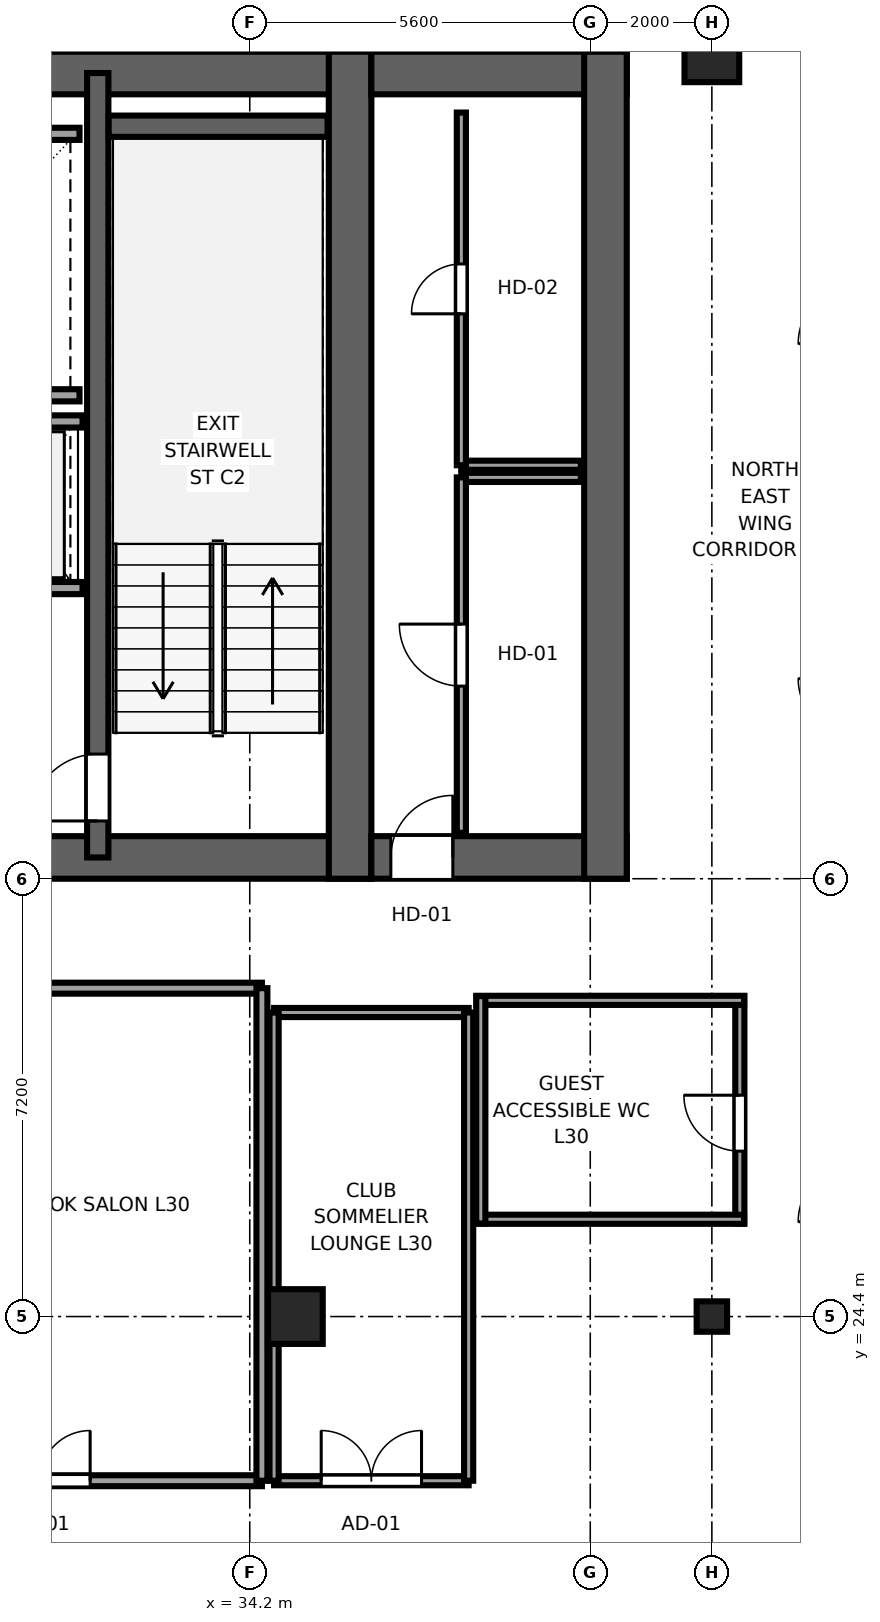
"""IFC4 building model, lengths in metres.
Left out: names, types, materials, properties, quantities, classifications, styles, units other than length and angle.
Written with IfcOpenShell. Run it as: python <this file> out.ifc"""

import sys

from ifc_helpers import new_model, si_unit, direction, frame, frame_2d, origin, origin_2d, place, context, subcontext, project, spatial, rectangle, i_section, extrude, source, transform, mapped, element, fill, save


model = new_model("IFC4")
c1 = context("Model", 3, precision=1e-05, world=origin(), true_north=direction((0.0, 1.0)))
c2 = subcontext(c1, "Body", "Model", "MODEL_VIEW")
j1 = project(units=[si_unit("LENGTHUNIT", "METRE"), si_unit("PLANEANGLEUNIT", "RADIAN")], contexts=[c1])
p1 = place(None, origin())
s1 = spatial("IfcSite", under=j1, at=p1, CompositionType="ELEMENT")
p2 = place(p1, origin())
s2 = spatial("IfcBuilding", under=s1, at=p2, CompositionType="ELEMENT")
p3 = place(p2, frame((0.0, 0.0, 118.65)))
s3 = spatial("IfcBuildingStorey", under=s2, at=p3, CompositionType="ELEMENT", Elevation=118.65)
p4 = place(p3, frame((9.8, 31.95, 0.0), z_axis=(0.0, 0.0, 1.0), x_axis=(1.0, 0.0, 0.0)))
e1 = element("IfcWall", 1, at=p4, inside=s3, PredefinedType="SHEAR", context=c2, shape_type="SweptSolid", body=[
    extrude(rectangle(XDim=26.4, YDim=0.7, at=frame_2d((13.2, 0.0))), origin(), (0.0, 0.0, 1.0), 3.55),
])
p5 = place(p4, frame((7.65, 0.0, 0.0), z_axis=(0.0, 0.0, 1.0), x_axis=(-1.0, 0.0, 0.0)))
e2 = element("IfcOpeningElement", 2, at=p5, cuts=e1, PredefinedType="OPENING", context=c2, shape_type="SweptSolid", body=[
    extrude(rectangle(XDim=1.5, YDim=2.04, at=frame_2d((0.75, 1.02))), frame((0.0, 0.36, 0.0), z_axis=(0.0, -1.0, 0.0), x_axis=(1.0, 0.0, 0.0)), (0.0, 0.0, 1.0), 0.72),
])
p6 = place(p4, frame((13.95, 0.0, 0.0), z_axis=(0.0, 0.0, 1.0), x_axis=(-1.0, 0.0, 0.0)))
e3 = element("IfcOpeningElement", 3, at=p6, cuts=e1, PredefinedType="OPENING", context=c2, shape_type="SweptSolid", body=[
    extrude(rectangle(XDim=1.5, YDim=2.04, at=frame_2d((0.75, 1.02))), frame((0.0, 0.36, 0.0), z_axis=(0.0, -1.0, 0.0), x_axis=(1.0, 0.0, 0.0)), (0.0, 0.0, 1.0), 0.72),
])
p7 = place(p4, frame((20.25, 0.0, 0.0), z_axis=(0.0, 0.0, 1.0), x_axis=(-1.0, 0.0, 0.0)))
e4 = element("IfcOpeningElement", 4, at=p7, cuts=e1, PredefinedType="OPENING", context=c2, shape_type="SweptSolid", body=[
    extrude(rectangle(XDim=1.5, YDim=2.04, at=frame_2d((0.75, 1.02))), frame((0.0, 0.36, 0.0), z_axis=(0.0, -1.0, 0.0), x_axis=(1.0, 0.0, 0.0)), (0.0, 0.0, 1.0), 0.72),
])
p8 = place(p3, frame((9.8, 44.85, 0.0), z_axis=(0.0, 0.0, 1.0), x_axis=(1.0, 0.0, 0.0)))
e5 = element("IfcWall", 5, at=p8, inside=s3, PredefinedType="SHEAR", context=c2, shape_type="SweptSolid", body=[
    extrude(rectangle(XDim=26.4, YDim=0.7, at=frame_2d((13.2, 0.0))), origin(), (0.0, 0.0, 1.0), 3.55),
])
p9 = place(p3, frame((35.85, 31.6, 0.0), z_axis=(0.0, 0.0, 1.0), x_axis=(0.0, 1.0, 0.0)))
e6 = element("IfcWall", 6, at=p9, inside=s3, PredefinedType="SHEAR", context=c2, shape_type="SweptSolid", body=[
    extrude(rectangle(XDim=13.6, YDim=0.7, at=frame_2d((6.8, 0.0))), origin(), (0.0, 0.0, 1.0), 3.55),
])
p10 = place(p3, frame((31.7, 31.95, 0.0), z_axis=(0.0, 0.0, 1.0), x_axis=(0.0, 1.0, 0.0)))
e7 = element("IfcWall", 7, at=p10, inside=s3, PredefinedType="SHEAR", context=c2, shape_type="SweptSolid", body=[
    extrude(rectangle(XDim=12.9, YDim=0.35, at=frame_2d((6.45, 0.0))), origin(), (0.0, 0.0, 1.0), 3.55),
])
p11 = place(p10, frame((1.7, 0.0, 0.0), z_axis=(0.0, 0.0, 1.0), x_axis=(-1.0, 0.0, 0.0)))
e8 = element("IfcOpeningElement", 8, at=p11, cuts=e7, PredefinedType="OPENING", context=c2, shape_type="SweptSolid", body=[
    extrude(rectangle(XDim=1.1, YDim=2.12, at=frame_2d((0.55, 1.06))), frame((0.0, 0.185, 0.0), z_axis=(0.0, -1.0, 0.0), x_axis=(1.0, 0.0, 0.0)), (0.0, 0.0, 1.0), 0.37),
])
p12 = place(p3, frame((36.2, 31.95, 0.0), z_axis=(0.0, 0.0, 1.0), x_axis=(1.0, 0.0, 0.0)))
e9 = element("IfcWall", 9, at=p12, inside=s3, PredefinedType="SHEAR", context=c2, shape_type="SweptSolid", body=[
    extrude(rectangle(XDim=4.2, YDim=0.7, at=frame_2d((2.1, 0.0))), origin(), (0.0, 0.0, 1.0), 3.55),
])
p13 = place(p12, frame((1.34, 0.0, 0.0), z_axis=(0.0, 0.0, 1.0), x_axis=(-1.0, 0.0, 0.0)))
e10 = element("IfcOpeningElement", 10, at=p13, cuts=e9, PredefinedType="OPENING", context=c2, shape_type="SweptSolid", body=[
    extrude(rectangle(XDim=1.02, YDim=2.03, at=frame_2d((0.51, 1.015))), frame((0.0, 0.36, 0.0), z_axis=(0.0, -1.0, 0.0), x_axis=(1.0, 0.0, 0.0)), (0.0, 0.0, 1.0), 0.72),
])
p14 = place(p3, frame((36.2, 44.85, 0.0), z_axis=(0.0, 0.0, 1.0), x_axis=(1.0, 0.0, 0.0)))
e11 = element("IfcWall", 11, at=p14, inside=s3, PredefinedType="SHEAR", context=c2, shape_type="SweptSolid", body=[
    extrude(rectangle(XDim=4.2, YDim=0.7, at=frame_2d((2.1, 0.0))), origin(), (0.0, 0.0, 1.0), 3.55),
])
p15 = place(p3, frame((40.05, 31.6, 0.0), z_axis=(0.0, 0.0, 1.0), x_axis=(0.0, 1.0, 0.0)))
e12 = element("IfcWall", 12, at=p15, inside=s3, PredefinedType="SHEAR", context=c2, shape_type="SweptSolid", body=[
    extrude(rectangle(XDim=13.6, YDim=0.7, at=frame_2d((6.8, 0.0))), origin(), (0.0, 0.0, 1.0), 3.55),
])
p16 = place(p3, frame((31.88, 43.975, 0.0), z_axis=(0.0, 0.0, 1.0), x_axis=(1.0, 0.0, 0.0)))
e13 = element("IfcWall", 13, at=p16, inside=s3, PredefinedType="SHEAR", context=c2, shape_type="SweptSolid", body=[
    extrude(rectangle(XDim=3.6, YDim=0.35, at=frame_2d((1.8, 0.0))), origin(), (0.0, 0.0, 1.0), 3.55),
])
m1 = source(origin(), c2, "Body", "SweptSolid", [
    extrude(rectangle(XDim=0.9, YDim=0.9, at=origin_2d()), origin(), (0.0, 0.0, 1.0), 3.55),
])
p17 = place(p3, frame((34.95, 24.4, 0.0), z_axis=(0.0, 0.0, 1.0), x_axis=(1.0, 0.0, 0.0)))
e14 = element("IfcColumn", 14, at=p17, inside=s3, PredefinedType="COLUMN", context=c2, shape_type="MappedRepresentation", body=[
    mapped(m1, transform((0.0, 0.0, 0.0), x_axis=(1.0, 0.0, 0.0), y_axis=(0.0, 1.0, 0.0), z_axis=(0.0, 0.0, 1.0), scale=1.0)),
])
m2 = source(origin(), c2, "Body", "SweptSolid", [
    extrude(i_section(OverallWidth=0.5, OverallDepth=0.5, WebThickness=0.022, FlangeThickness=0.034, at=origin_2d()), origin(), (0.0, 0.0, 1.0), 3.55),
])
p18 = place(p3, frame((41.8, 24.4, 0.0), z_axis=(0.0, 0.0, 1.0), x_axis=(1.0, 0.0, 0.0)))
e15 = element("IfcColumn", 15, at=p18, inside=s3, PredefinedType="COLUMN", context=c2, shape_type="MappedRepresentation", body=[
    mapped(m2, transform((0.0, 0.0, 0.0), x_axis=(1.0, 0.0, 0.0), y_axis=(0.0, 1.0, 0.0), z_axis=(0.0, 0.0, 1.0), scale=1.0)),
])
p19 = place(p3, frame((41.8, 45.15, 0.0), z_axis=(0.0, 0.0, 1.0), x_axis=(1.0, 0.0, 0.0)))
e16 = element("IfcColumn", 16, at=p19, inside=s3, PredefinedType="COLUMN", context=c2, shape_type="MappedRepresentation", body=[
    mapped(m1, transform((0.0, 0.0, 0.0), x_axis=(1.0, 0.0, 0.0), y_axis=(0.0, 1.0, 0.0), z_axis=(0.0, 0.0, 1.0), scale=1.0)),
])
for number, where, z_axis, x_axis in (
    (17, (27.3, 39.55, 0.0), (0.0, 0.0, 1.0), (1.0, 0.0, 0.0)),
    (18, (27.3, 43.85, 0.0), (0.0, 0.0, 1.0), (1.0, 0.0, 0.0)),
):
    element("IfcWall", number, at=place(p3, frame(where, z_axis=z_axis, x_axis=x_axis)), inside=s3, PredefinedType="SOLIDWALL", context=c2, shape_type="SweptSolid", body=[
        extrude(rectangle(XDim=4.1, YDim=0.2, at=frame_2d((2.05, 0.0))), origin(), (0.0, 0.0, 1.0), 3.37),
    ])
p20 = place(p3, frame((27.375, 36.38, 0.0), z_axis=(0.0, 0.0, 1.0), x_axis=(1.0, 0.0, 0.0)))
e19 = element("IfcWall", 19, at=p20, inside=s3, PredefinedType="SOLIDWALL", context=c2, shape_type="SweptSolid", body=[
    extrude(rectangle(XDim=4.075, YDim=0.2, at=frame_2d((2.038, 0.0))), origin(), (0.0, 0.0, 1.0), 3.37),
])
p21 = place(p20, frame((0.525, 0.0, 0.0)))
e20 = element("IfcOpeningElement", 20, at=p21, cuts=e19, PredefinedType="OPENING", context=c2, shape_type="SweptSolid", body=[
    extrude(rectangle(XDim=1.1, YDim=2.12, at=frame_2d((0.55, 1.06))), frame((0.0, 0.11, 0.0), z_axis=(0.0, -1.0, 0.0), x_axis=(1.0, 0.0, 0.0)), (0.0, 0.0, 1.0), 0.22),
])
p22 = place(p20, frame((2.425, 0.0, 0.0)))
e21 = element("IfcOpeningElement", 21, at=p22, cuts=e19, PredefinedType="OPENING", context=c2, shape_type="SweptSolid", body=[
    extrude(rectangle(XDim=1.1, YDim=2.12, at=frame_2d((0.55, 1.06))), frame((0.0, 0.11, 0.0), z_axis=(0.0, -1.0, 0.0), x_axis=(1.0, 0.0, 0.0)), (0.0, 0.0, 1.0), 0.22),
])
p23 = place(p3, frame((27.375, 39.12, 0.0), z_axis=(0.0, 0.0, 1.0), x_axis=(1.0, 0.0, 0.0)))
e22 = element("IfcWall", 22, at=p23, inside=s3, PredefinedType="SOLIDWALL", context=c2, shape_type="SweptSolid", body=[
    extrude(rectangle(XDim=4.075, YDim=0.2, at=frame_2d((2.038, 0.0))), origin(), (0.0, 0.0, 1.0), 3.37),
])
p24 = place(p3, frame((37.68, 38.2, 0.0), z_axis=(0.0, 0.0, 1.0), x_axis=(1.0, 0.0, 0.0)))
e23 = element("IfcWall", 23, at=p24, inside=s3, PredefinedType="PARTITIONING", context=c2, shape_type="SweptSolid", body=[
    extrude(rectangle(XDim=1.965, YDim=0.15, at=frame_2d((0.982, 0.0))), origin(), (0.0, 0.0, 1.0), 3.37),
])
p25 = place(p3, frame((37.68, 32.355, 0.0), z_axis=(0.0, 0.0, 1.0), x_axis=(0.0, 1.0, 0.0)))
e24 = element("IfcWall", 24, at=p25, inside=s3, PredefinedType="PARTITIONING", context=c2, shape_type="SweptSolid", body=[
    extrude(rectangle(XDim=5.845, YDim=0.15, at=frame_2d((2.922, 0.0))), origin(), (0.0, 0.0, 1.0), 3.37),
])
p26 = place(p25, frame((2.413, 0.0, 0.0)))
e25 = element("IfcOpeningElement", 25, at=p26, cuts=e24, PredefinedType="OPENING", context=c2, shape_type="SweptSolid", body=[
    extrude(rectangle(XDim=1.02, YDim=2.03, at=frame_2d((0.51, 1.015))), frame((0.0, 0.085, 0.0), z_axis=(0.0, -1.0, 0.0), x_axis=(1.0, 0.0, 0.0)), (0.0, 0.0, 1.0), 0.17),
])
p27 = place(p3, frame((37.68, 38.4, 0.0), z_axis=(0.0, 0.0, 1.0), x_axis=(1.0, 0.0, 0.0)))
e26 = element("IfcWall", 26, at=p27, inside=s3, PredefinedType="PARTITIONING", context=c2, shape_type="SweptSolid", body=[
    extrude(rectangle(XDim=1.965, YDim=0.15, at=frame_2d((0.982, 0.0))), origin(), (0.0, 0.0, 1.0), 3.37),
])
p28 = place(p3, frame((37.68, 38.4, 0.0), z_axis=(0.0, 0.0, 1.0), x_axis=(0.0, 1.0, 0.0)))
e27 = element("IfcWall", 27, at=p28, inside=s3, PredefinedType="PARTITIONING", context=c2, shape_type="SweptSolid", body=[
    extrude(rectangle(XDim=5.8, YDim=0.15, at=frame_2d((2.9, 0.0))), origin(), (0.0, 0.0, 1.0), 3.37),
])
p29 = place(p28, frame((2.49, 0.0, 0.0)))
e28 = element("IfcOpeningElement", 28, at=p29, cuts=e27, PredefinedType="OPENING", context=c2, shape_type="SweptSolid", body=[
    extrude(rectangle(XDim=0.82, YDim=2.01, at=frame_2d((0.41, 1.005))), frame((0.0, 0.085, 0.0), z_axis=(0.0, -1.0, 0.0), x_axis=(1.0, 0.0, 0.0)), (0.0, 0.0, 1.0), 0.17),
])
p30 = place(p3, frame((42.26, 25.93, 0.0), z_axis=(0.0, 0.0, 1.0), x_axis=(0.0, 1.0, 0.0)))
e29 = element("IfcWall", 29, at=p30, inside=s3, PredefinedType="PARTITIONING", context=c2, shape_type="SweptSolid", body=[
    extrude(rectangle(XDim=3.74, YDim=0.15, at=frame_2d((1.87, 0.0))), origin(), (0.0, 0.0, 1.0), 3.37),
])
p31 = place(p30, frame((1.19, 0.0, 0.0)))
e30 = element("IfcOpeningElement", 30, at=p31, cuts=e29, PredefinedType="OPENING", context=c2, shape_type="SweptSolid", body=[
    extrude(rectangle(XDim=0.92, YDim=2.01, at=frame_2d((0.46, 1.005))), frame((0.0, 0.085, 0.0), z_axis=(0.0, -1.0, 0.0), x_axis=(1.0, 0.0, 0.0)), (0.0, 0.0, 1.0), 0.17),
])
for number, where, z_axis, x_axis in (
    (31, (37.93, 26.0, 0.0), (0.0, 0.0, 1.0), (1.0, 0.0, 0.0)),
    (32, (37.93, 29.6, 0.0), (0.0, 0.0, 1.0), (1.0, 0.0, 0.0)),
):
    element("IfcWall", number, at=place(p3, frame(where, z_axis=z_axis, x_axis=x_axis)), inside=s3, PredefinedType="PARTITIONING", context=c2, shape_type="SweptSolid", body=[
        extrude(rectangle(XDim=4.4, YDim=0.15, at=frame_2d((2.2, 0.0))), origin(), (0.0, 0.0, 1.0), 3.37),
    ])
p32 = place(p3, frame((38.0, 25.93, 0.0), z_axis=(0.0, 0.0, 1.0), x_axis=(0.0, 1.0, 0.0)))
e33 = element("IfcWall", 33, at=p32, inside=s3, PredefinedType="PARTITIONING", context=c2, shape_type="SweptSolid", body=[
    extrude(rectangle(XDim=3.74, YDim=0.15, at=frame_2d((1.87, 0.0))), origin(), (0.0, 0.0, 1.0), 3.37),
])
p33 = place(p3, frame((27.1, 21.7, 0.0), z_axis=(0.0, 0.0, 1.0), x_axis=(1.0, 0.0, 0.0)))
e34 = element("IfcWall", 34, at=p33, inside=s3, PredefinedType="PARTITIONING", context=c2, shape_type="SweptSolid", body=[
    extrude(rectangle(XDim=7.3, YDim=0.18, at=frame_2d((3.65, 0.0))), origin(), (0.0, 0.0, 1.0), 3.37),
])
p34 = place(p33, frame((2.825, 0.0, 0.0)))
e35 = element("IfcOpeningElement", 35, at=p34, cuts=e34, PredefinedType="OPENING", context=c2, shape_type="SweptSolid", body=[
    extrude(rectangle(XDim=1.65, YDim=2.15, at=frame_2d((0.825, 1.075))), frame((0.0, 0.1, 0.0), z_axis=(0.0, -1.0, 0.0), x_axis=(1.0, 0.0, 0.0)), (0.0, 0.0, 1.0), 0.2),
])
p35 = place(p3, frame((27.1, 29.8, 0.0), z_axis=(0.0, 0.0, 1.0), x_axis=(1.0, 0.0, 0.0)))
e36 = element("IfcWall", 36, at=p35, inside=s3, PredefinedType="PARTITIONING", context=c2, shape_type="SweptSolid", body=[
    extrude(rectangle(XDim=7.3, YDim=0.18, at=frame_2d((3.65, 0.0))), origin(), (0.0, 0.0, 1.0), 3.37),
])
p36 = place(p3, frame((34.4, 21.7, 0.0), z_axis=(0.0, 0.0, 1.0), x_axis=(0.0, 1.0, 0.0)))
e37 = element("IfcWall", 37, at=p36, inside=s3, PredefinedType="PARTITIONING", context=c2, shape_type="SweptSolid", body=[
    extrude(rectangle(XDim=8.1, YDim=0.18, at=frame_2d((4.05, 0.0))), origin(), (0.0, 0.0, 1.0), 3.37),
])
p37 = place(p3, frame((34.6, 21.7, 0.0), z_axis=(0.0, 0.0, 1.0), x_axis=(1.0, 0.0, 0.0)))
e38 = element("IfcWall", 38, at=p37, inside=s3, PredefinedType="PARTITIONING", context=c2, shape_type="SweptSolid", body=[
    extrude(rectangle(XDim=3.2, YDim=0.15, at=frame_2d((1.6, 0.0))), origin(), (0.0, 0.0, 1.0), 3.37),
])
p38 = place(p37, frame((0.775, 0.0, 0.0)))
e39 = element("IfcOpeningElement", 39, at=p38, cuts=e38, PredefinedType="OPENING", context=c2, shape_type="SweptSolid", body=[
    extrude(rectangle(XDim=1.65, YDim=2.15, at=frame_2d((0.825, 1.075))), frame((0.0, 0.085, 0.0), z_axis=(0.0, -1.0, 0.0), x_axis=(1.0, 0.0, 0.0)), (0.0, 0.0, 1.0), 0.17),
])
p39 = place(p3, frame((34.6, 29.4, 0.0), z_axis=(0.0, 0.0, 1.0), x_axis=(1.0, 0.0, 0.0)))
e40 = element("IfcWall", 40, at=p39, inside=s3, PredefinedType="PARTITIONING", context=c2, shape_type="SweptSolid", body=[
    extrude(rectangle(XDim=3.2, YDim=0.15, at=frame_2d((1.6, 0.0))), origin(), (0.0, 0.0, 1.0), 3.37),
])
for number, where, z_axis, x_axis in (
    (41, (34.6, 21.7, 0.0), (0.0, 0.0, 1.0), (0.0, 1.0, 0.0)),
    (42, (37.8, 21.7, 0.0), (0.0, 0.0, 1.0), (0.0, 1.0, 0.0)),
):
    element("IfcWall", number, at=place(p3, frame(where, z_axis=z_axis, x_axis=x_axis)), inside=s3, PredefinedType="PARTITIONING", context=c2, shape_type="SweptSolid", body=[
        extrude(rectangle(XDim=7.7, YDim=0.15, at=frame_2d((3.85, 0.0))), origin(), (0.0, 0.0, 1.0), 3.37),
    ])
m3 = source(origin(), c2, "Body", "SweptSolid", [
    extrude(rectangle(XDim=1.1, YDim=2.12, at=frame_2d((0.55, 1.06))), frame((0.0, 0.025, 0.0), z_axis=(0.0, -1.0, 0.0), x_axis=(1.0, 0.0, 0.0)), (0.0, 0.0, 1.0), 0.05),
])
p40 = place(p11, origin())
e43 = element("IfcDoor", 43, at=p40, inside=s3, OperationType="SINGLE_SWING_LEFT", PredefinedType="DOOR", context=c2, shape_type="MappedRepresentation", body=[
    mapped(m3, transform((0.0, 0.0, 0.0), x_axis=(1.0, 0.0, 0.0), y_axis=(0.0, 1.0, 0.0), z_axis=(0.0, 0.0, 1.0), scale=1.0)),
])
fill(e8, e43)
m4 = source(origin(), c2, "Body", "SweptSolid", [
    extrude(rectangle(XDim=1.02, YDim=2.03, at=frame_2d((0.51, 1.015))), frame((0.0, 0.025, 0.0), z_axis=(0.0, -1.0, 0.0), x_axis=(1.0, 0.0, 0.0)), (0.0, 0.0, 1.0), 0.05),
])
p41 = place(p13, origin())
e44 = element("IfcDoor", 44, at=p41, inside=s3, OperationType="SINGLE_SWING_RIGHT", PredefinedType="DOOR", context=c2, shape_type="MappedRepresentation", body=[
    mapped(m4, transform((0.0, 0.0, 0.0), x_axis=(1.0, 0.0, 0.0), y_axis=(0.0, 1.0, 0.0), z_axis=(0.0, 0.0, 1.0), scale=1.0)),
])
fill(e10, e44)
p42 = place(p26, origin())
e45 = element("IfcDoor", 45, at=p42, inside=s3, OperationType="SINGLE_SWING_RIGHT", PredefinedType="DOOR", context=c2, shape_type="MappedRepresentation", body=[
    mapped(m4, transform((0.0, 0.0, 0.0), x_axis=(1.0, 0.0, 0.0), y_axis=(0.0, 1.0, 0.0), z_axis=(0.0, 0.0, 1.0), scale=1.0)),
])
fill(e25, e45)
m5 = source(origin(), c2, "Body", "SweptSolid", [
    extrude(rectangle(XDim=0.82, YDim=2.01, at=frame_2d((0.41, 1.005))), frame((0.0, 0.025, 0.0), z_axis=(0.0, -1.0, 0.0), x_axis=(1.0, 0.0, 0.0)), (0.0, 0.0, 1.0), 0.05),
])
p43 = place(p29, origin())
e46 = element("IfcDoor", 46, at=p43, inside=s3, OperationType="SINGLE_SWING_LEFT", PredefinedType="DOOR", context=c2, shape_type="MappedRepresentation", body=[
    mapped(m5, transform((0.0, 0.0, 0.0), x_axis=(1.0, 0.0, 0.0), y_axis=(0.0, 1.0, 0.0), z_axis=(0.0, 0.0, 1.0), scale=1.0)),
])
fill(e28, e46)
m6 = source(origin(), c2, "Body", "SweptSolid", [
    extrude(rectangle(XDim=0.92, YDim=2.01, at=frame_2d((0.46, 1.005))), frame((0.0, 0.025, 0.0), z_axis=(0.0, -1.0, 0.0), x_axis=(1.0, 0.0, 0.0)), (0.0, 0.0, 1.0), 0.05),
])
p44 = place(p31, origin())
e47 = element("IfcDoor", 47, at=p44, inside=s3, OperationType="SINGLE_SWING_RIGHT", PredefinedType="DOOR", context=c2, shape_type="MappedRepresentation", body=[
    mapped(m6, transform((0.0, 0.0, 0.0), x_axis=(1.0, 0.0, 0.0), y_axis=(0.0, 1.0, 0.0), z_axis=(0.0, 0.0, 1.0), scale=1.0)),
])
fill(e30, e47)
m7 = source(origin(), c2, "Body", "SweptSolid", [
    extrude(rectangle(XDim=1.65, YDim=2.15, at=frame_2d((0.825, 1.075))), frame((0.0, 0.025, 0.0), z_axis=(0.0, -1.0, 0.0), x_axis=(1.0, 0.0, 0.0)), (0.0, 0.0, 1.0), 0.05),
])
p45 = place(p34, origin())
e48 = element("IfcDoor", 48, at=p45, inside=s3, OperationType="DOUBLE_DOOR_SINGLE_SWING", PredefinedType="DOOR", context=c2, shape_type="MappedRepresentation", body=[
    mapped(m7, transform((0.0, 0.0, 0.0), x_axis=(1.0, 0.0, 0.0), y_axis=(0.0, 1.0, 0.0), z_axis=(0.0, 0.0, 1.0), scale=1.0)),
])
fill(e35, e48)
p46 = place(p38, origin())
e49 = element("IfcDoor", 49, at=p46, inside=s3, OperationType="DOUBLE_DOOR_SINGLE_SWING", PredefinedType="DOOR", context=c2, shape_type="MappedRepresentation", body=[
    mapped(m7, transform((0.0, 0.0, 0.0), x_axis=(1.0, 0.0, 0.0), y_axis=(0.0, 1.0, 0.0), z_axis=(0.0, 0.0, 1.0), scale=1.0)),
])
fill(e39, e49)
save(model, sys.argv[1])
